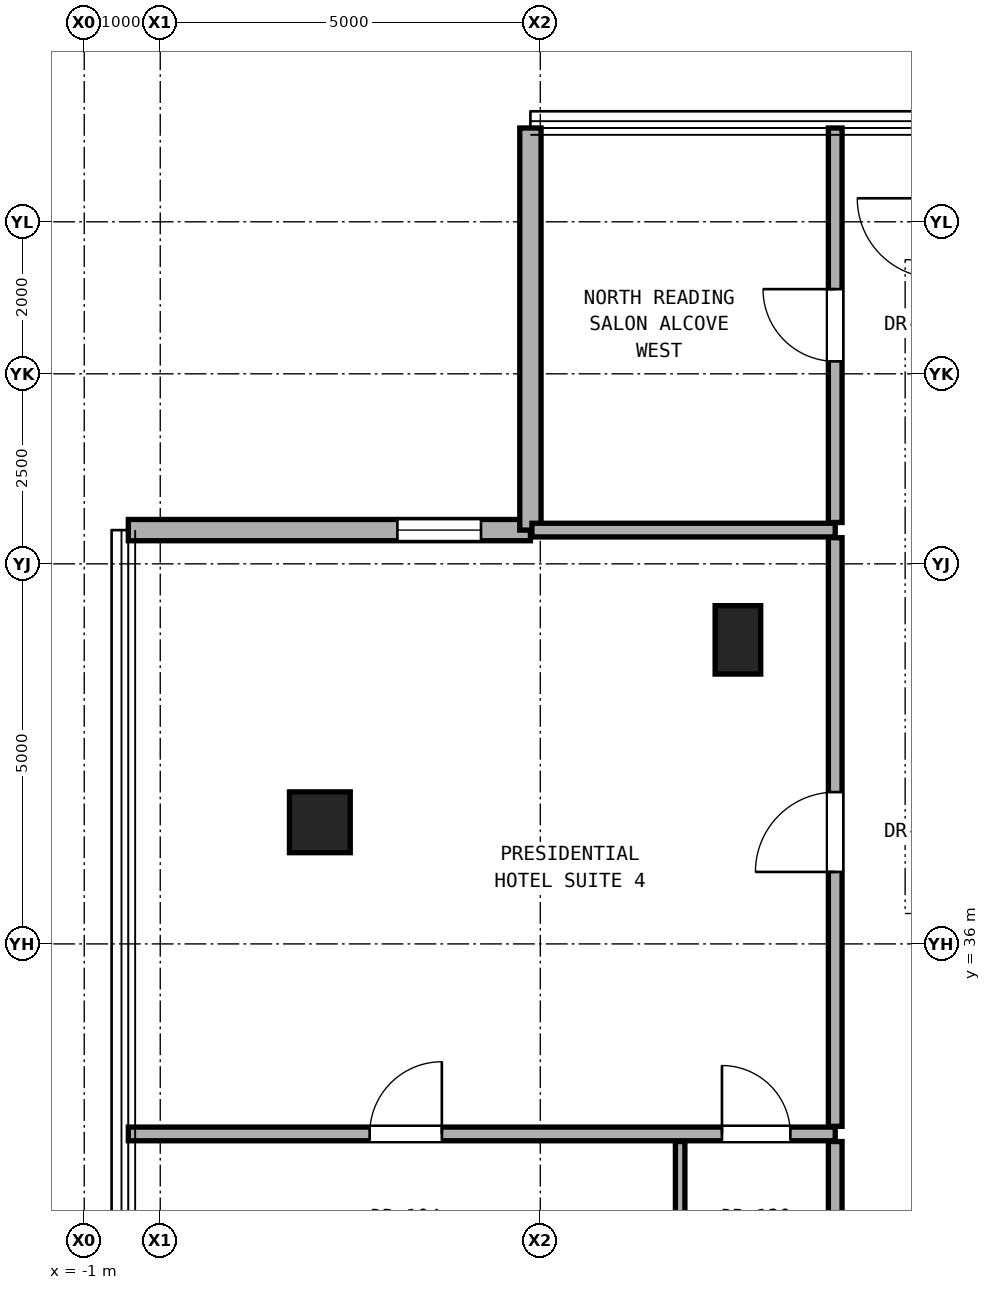
"""IFC4 building model, lengths in metres.
Left out: names, types, materials, properties, quantities, classifications, styles, units other than length and angle.
Written with IfcOpenShell. Run it as: python <this file> out.ifc"""

import sys

from ifc_helpers import new_model, si_unit, direction, frame, frame_2d, origin, origin_2d, place, context, subcontext, project, spatial, rectangle, hollow_rectangle, extrude, element, fill, save


model = new_model("IFC4")
c1 = context("Model", 3, precision=1e-05, world=origin(), true_north=direction((0.0, 1.0)))
c2 = subcontext(c1, "Body", "Model", "MODEL_VIEW")
j1 = project(units=[si_unit("LENGTHUNIT", "METRE"), si_unit("PLANEANGLEUNIT", "RADIAN")], contexts=[c1])
p1 = place(None, origin())
s1 = spatial("IfcSite", under=j1, at=p1, CompositionType="ELEMENT")
p2 = place(p1, origin())
s2 = spatial("IfcBuilding", under=s1, at=p2, CompositionType="ELEMENT")
p3 = place(p2, frame((0.0, 0.0, 229.3)))
s3 = spatial("IfcBuildingStorey", under=s2, at=p3, CompositionType="ELEMENT", Elevation=229.3)
p4 = place(p3, frame((2.1, 37.6, 0.0), z_axis=(0.0, 0.0, 1.0), x_axis=(1.0, 0.0, 0.0)))
e1 = element("IfcColumn", 1, at=p4, inside=s3, PredefinedType="COLUMN", context=c2, shape_type="SweptSolid", body=[
    extrude(hollow_rectangle(XDim=0.8, YDim=0.8, WallThickness=0.045, at=origin_2d()), origin(), (0.0, 0.0, 1.0), 3.3),
])
p5 = place(p3, frame((7.6, 40.0, 0.0), z_axis=(0.0, 0.0, 1.0), x_axis=(1.0, 0.0, 0.0)))
e2 = element("IfcColumn", 2, at=p5, inside=s3, PredefinedType="PILASTER", context=c2, shape_type="SweptSolid", body=[
    extrude(rectangle(XDim=0.6, YDim=0.9, at=origin_2d()), origin(), (0.0, 0.0, 1.0), 3.3),
])
p6 = place(p3, frame((4.87, 41.444, 0.0), z_axis=(0.0, 0.0, 1.0), x_axis=(-1.0, 0.0, 0.0)))
e3 = element("IfcWall", 3, at=p6, inside=s3, PredefinedType="SOLIDWALL", context=c2, shape_type="SweptSolid", body=[
    extrude(rectangle(XDim=5.29, YDim=0.28, at=frame_2d((2.645, 0.0))), origin(), (0.0, 0.0, 1.0), 3.08),
])
p7 = place(p6, frame((0.65, 0.0, 0.85)))
e4 = element("IfcOpeningElement", 4, at=p7, cuts=e3, PredefinedType="OPENING", context=c2, shape_type="SweptSolid", body=[
    extrude(rectangle(XDim=1.1, YDim=2.0, at=frame_2d((0.55, 1.0))), frame((0.0, 0.15, 0.0), z_axis=(0.0, -1.0, 0.0), x_axis=(1.0, 0.0, 0.0)), (0.0, 0.0, 1.0), 0.3),
])
p8 = place(p3, frame((4.87, 46.734, 0.0), z_axis=(0.0, 0.0, 1.0), x_axis=(0.0, -1.0, 0.0)))
e5 = element("IfcWall", 5, at=p8, inside=s3, PredefinedType="SOLIDWALL", context=c2, shape_type="SweptSolid", body=[
    extrude(rectangle(XDim=5.29, YDim=0.28, at=frame_2d((2.645, 0.0))), origin(), (0.0, 0.0, 1.0), 3.08),
])
p9 = place(p3, frame((-0.42, 33.5, 0.0), z_axis=(0.0, 0.0, 1.0), x_axis=(1.0, 0.0, 0.0)))
e6 = element("IfcWall", 6, at=p9, inside=s3, PredefinedType="PARTITIONING", context=c2, shape_type="SweptSolid", body=[
    extrude(rectangle(XDim=9.3, YDim=0.18, at=frame_2d((4.65, 0.0))), origin(), (0.0, 0.0, 1.0), 2.319),
])
p10 = place(p9, frame((3.175, 0.0, 0.0)))
e7 = element("IfcOpeningElement", 7, at=p10, cuts=e6, PredefinedType="OPENING", context=c2, shape_type="SweptSolid", body=[
    extrude(rectangle(XDim=0.95, YDim=2.15, at=frame_2d((0.475, 1.075))), frame((0.0, 0.1, 0.0), z_axis=(0.0, -1.0, 0.0), x_axis=(1.0, 0.0, 0.0)), (0.0, 0.0, 1.0), 0.2),
])
p11 = place(p9, frame((7.81, 0.0, 0.0)))
e8 = element("IfcOpeningElement", 8, at=p11, cuts=e6, PredefinedType="OPENING", context=c2, shape_type="SweptSolid", body=[
    extrude(rectangle(XDim=0.9, YDim=2.1, at=frame_2d((0.45, 1.05))), frame((0.0, 0.1, 0.0), z_axis=(0.0, -1.0, 0.0), x_axis=(1.0, 0.0, 0.0)), (0.0, 0.0, 1.0), 0.2),
])
p12 = place(p3, frame((4.89, 41.444, 0.0), z_axis=(0.0, 0.0, 1.0), x_axis=(1.0, 0.0, 0.0)))
e9 = element("IfcWall", 9, at=p12, inside=s3, PredefinedType="PARTITIONING", context=c2, shape_type="SweptSolid", body=[
    extrude(rectangle(XDim=3.99, YDim=0.18, at=frame_2d((1.995, 0.0))), origin(), (0.0, 0.0, 1.0), 3.1),
])
p13 = place(p3, frame((6.84, 31.272, 0.0), z_axis=(0.0, 0.0, 1.0), x_axis=(0.0, 1.0, 0.0)))
e10 = element("IfcWall", 10, at=p13, inside=s3, PredefinedType="PARTITIONING", context=c2, shape_type="SweptSolid", body=[
    extrude(rectangle(XDim=2.127, YDim=0.125, at=frame_2d((1.064, 0.0))), origin(), (0.0, 0.0, 1.0), 2.396),
])
p14 = place(p3, frame((8.88, 31.272, 0.0), z_axis=(0.0, 0.0, 1.0), x_axis=(0.0, 1.0, 0.0)))
e11 = element("IfcWall", 11, at=p14, inside=s3, PredefinedType="PARTITIONING", context=c2, shape_type="SweptSolid", body=[
    extrude(rectangle(XDim=2.127, YDim=0.18, at=frame_2d((1.064, 0.0))), origin(), (0.0, 0.0, 1.0), 2.396),
])
p15 = place(p3, frame((8.88, 33.6, 0.0), z_axis=(0.0, 0.0, 1.0), x_axis=(0.0, 1.0, 0.0)))
e12 = element("IfcWall", 12, at=p15, inside=s3, PredefinedType="PARTITIONING", context=c2, shape_type="SweptSolid", body=[
    extrude(rectangle(XDim=7.744, YDim=0.18, at=frame_2d((3.872, 0.0))), origin(), (0.0, 0.0, 1.0), 2.492),
])
p16 = place(p15, frame((3.347, 0.0, 0.0)))
e13 = element("IfcOpeningElement", 13, at=p16, cuts=e12, PredefinedType="OPENING", context=c2, shape_type="SweptSolid", body=[
    extrude(rectangle(XDim=1.05, YDim=2.2, at=frame_2d((0.525, 1.1))), frame((0.0, 0.1, 0.0), z_axis=(0.0, -1.0, 0.0), x_axis=(1.0, 0.0, 0.0)), (0.0, 0.0, 1.0), 0.2),
])
p17 = place(p3, frame((8.88, 41.544, 0.0), z_axis=(0.0, 0.0, 1.0), x_axis=(0.0, 1.0, 0.0)))
e14 = element("IfcWall", 14, at=p17, inside=s3, PredefinedType="PARTITIONING", context=c2, shape_type="SweptSolid", body=[
    extrude(rectangle(XDim=5.19, YDim=0.18, at=frame_2d((2.595, 0.0))), origin(), (0.0, 0.0, 1.0), 3.1),
])
p18 = place(p17, frame((2.12, 0.0, 0.0)))
e15 = element("IfcOpeningElement", 15, at=p18, cuts=e14, PredefinedType="OPENING", context=c2, shape_type="SweptSolid", body=[
    extrude(rectangle(XDim=0.95, YDim=2.15, at=frame_2d((0.475, 1.075))), frame((0.0, 0.1, 0.0), z_axis=(0.0, -1.0, 0.0), x_axis=(1.0, 0.0, 0.0)), (0.0, 0.0, 1.0), 0.2),
])
p19 = place(p7, origin())
e16 = element("IfcWindow", 16, at=p19, inside=s3, PartitioningType="SINGLE_PANEL", PredefinedType="WINDOW", context=c2, shape_type="SweptSolid", body=[
    extrude(rectangle(XDim=1.1, YDim=2.0, at=frame_2d((0.55, 1.0))), frame((0.0, 0.03, 0.0), z_axis=(0.0, -1.0, 0.0), x_axis=(1.0, 0.0, 0.0)), (0.0, 0.0, 1.0), 0.06),
])
fill(e4, e16)
p20 = place(p16, origin())
e17 = element("IfcDoor", 17, at=p20, inside=s3, OperationType="SINGLE_SWING_LEFT", PredefinedType="DOOR", context=c2, shape_type="SweptSolid", body=[
    extrude(rectangle(XDim=1.05, YDim=2.2, at=frame_2d((0.525, 1.1))), frame((0.0, 0.025, 0.0), z_axis=(0.0, -1.0, 0.0), x_axis=(1.0, 0.0, 0.0)), (0.0, 0.0, 1.0), 0.05),
])
fill(e13, e17)
p21 = place(p10, origin())
e18 = element("IfcDoor", 18, at=p21, inside=s3, OperationType="SINGLE_SWING_RIGHT", PredefinedType="DOOR", context=c2, shape_type="SweptSolid", body=[
    extrude(rectangle(XDim=0.95, YDim=2.15, at=frame_2d((0.475, 1.075))), frame((0.0, 0.025, 0.0), z_axis=(0.0, -1.0, 0.0), x_axis=(1.0, 0.0, 0.0)), (0.0, 0.0, 1.0), 0.05),
])
fill(e7, e18)
p22 = place(p11, origin())
e19 = element("IfcDoor", 19, at=p22, inside=s3, OperationType="SINGLE_SWING_LEFT", PredefinedType="DOOR", context=c2, shape_type="SweptSolid", body=[
    extrude(rectangle(XDim=0.9, YDim=2.1, at=frame_2d((0.45, 1.05))), frame((0.0, 0.025, 0.0), z_axis=(0.0, -1.0, 0.0), x_axis=(1.0, 0.0, 0.0)), (0.0, 0.0, 1.0), 0.05),
])
fill(e8, e19)
p23 = place(p18, origin())
e20 = element("IfcDoor", 20, at=p23, inside=s3, OperationType="SINGLE_SWING_RIGHT", PredefinedType="DOOR", context=c2, shape_type="SweptSolid", body=[
    extrude(rectangle(XDim=0.95, YDim=2.15, at=frame_2d((0.475, 1.075))), frame((0.0, 0.025, 0.0), z_axis=(0.0, -1.0, 0.0), x_axis=(1.0, 0.0, 0.0)), (0.0, 0.0, 1.0), 0.05),
])
fill(e15, e20)
save(model, sys.argv[1])
